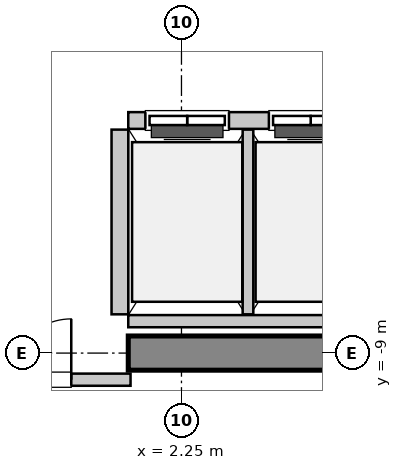
"""IFC4 building model, lengths in metres.
Left out: names, types, materials, properties, quantities, classifications, styles, units other than length and angle.
Written with IfcOpenShell. Run it as: python <this file> out.ifc"""

import sys

from ifc_helpers import new_model, si_unit, direction, frame, frame_2d, origin, place, context, subcontext, project, spatial, rectangle, extrude, source, transform, mapped, element, fill, save


model = new_model("IFC4")
c1 = context("Model", 3, precision=1e-05, world=origin(), true_north=direction((0.0, 1.0)))
c2 = subcontext(c1, "Body", "Model", "MODEL_VIEW")
j1 = project(units=[si_unit("LENGTHUNIT", "METRE"), si_unit("PLANEANGLEUNIT", "RADIAN")], contexts=[c1])
p1 = place(None, origin())
s1 = spatial("IfcSite", under=j1, at=p1, CompositionType="ELEMENT")
p2 = place(p1, origin())
s2 = spatial("IfcBuilding", under=s1, at=p2, CompositionType="ELEMENT")
p3 = place(p2, frame((0.0, 0.0, 221.8)))
s3 = spatial("IfcBuildingStorey", under=s2, at=p3, CompositionType="ELEMENT", Elevation=221.8)
m1 = source(origin(), c2, "Body", "SweptSolid", [
    extrude(rectangle(XDim=9.925, YDim=0.45, at=frame_2d((4.962, 0.0))), origin(), (0.0, 0.0, 1.0), 3.8),
])
p4 = place(p3, frame((1.55, -9.0, 0.0), z_axis=(0.0, 0.0, 1.0), x_axis=(1.0, 0.0, 0.0)))
e1 = element("IfcWall", 1, at=p4, inside=s3, PredefinedType="SHEAR", context=c2, shape_type="MappedRepresentation", body=[
    mapped(m1, transform((0.0, 0.0, 0.0), x_axis=(1.0, 0.0, 0.0), y_axis=(0.0, 1.0, 0.0), z_axis=(0.0, 0.0, 1.0), scale=1.0)),
])
m2 = source(origin(), c2, "Body", "SweptSolid", [
    extrude(rectangle(XDim=3.2, YDim=0.22, at=frame_2d((1.6, 0.0))), origin(), (0.0, 0.0, 1.0), 3.535),
])
p5 = place(p3, frame((4.75, -5.94, 0.0), z_axis=(0.0, 0.0, 1.0), x_axis=(-1.0, 0.0, 0.0)))
e2 = element("IfcWall", 2, at=p5, inside=s3, PredefinedType="SOLIDWALL", context=c2, shape_type="MappedRepresentation", body=[
    mapped(m2, transform((0.0, 0.0, 0.0), x_axis=(1.0, 0.0, 0.0), y_axis=(0.0, 1.0, 0.0), z_axis=(0.0, 0.0, 1.0), scale=1.0)),
])
p6 = place(p5, frame((1.875, 0.0, 0.0)))
e3 = element("IfcOpeningElement", 3, at=p6, cuts=e2, PredefinedType="OPENING", context=c2, shape_type="SweptSolid", body=[
    extrude(rectangle(XDim=1.1, YDim=2.2, at=frame_2d((0.55, 1.1))), frame((0.0, 0.12, 0.0), z_axis=(0.0, -1.0, 0.0), x_axis=(1.0, 0.0, 0.0)), (0.0, 0.0, 1.0), 0.24),
])
p7 = place(p5, frame((0.25, 0.0, 0.0)))
e4 = element("IfcOpeningElement", 4, at=p7, cuts=e2, PredefinedType="OPENING", context=c2, shape_type="SweptSolid", body=[
    extrude(rectangle(XDim=1.1, YDim=2.2, at=frame_2d((0.55, 1.1))), frame((0.0, 0.12, 0.0), z_axis=(0.0, -1.0, 0.0), x_axis=(1.0, 0.0, 0.0)), (0.0, 0.0, 1.0), 0.24),
])
m3 = source(origin(), c2, "Body", "SweptSolid", [
    extrude(rectangle(XDim=3.2, YDim=0.16, at=frame_2d((1.6, 0.0))), origin(), (0.0, 0.0, 1.0), 2.625),
])
p8 = place(p3, frame((1.55, -8.58, 0.0), z_axis=(0.0, 0.0, 1.0), x_axis=(1.0, 0.0, 0.0)))
e5 = element("IfcWall", 5, at=p8, inside=s3, PredefinedType="PARTITIONING", context=c2, shape_type="MappedRepresentation", body=[
    mapped(m3, transform((0.0, 0.0, 0.0), x_axis=(1.0, 0.0, 0.0), y_axis=(0.0, 1.0, 0.0), z_axis=(0.0, 0.0, 1.0), scale=1.0)),
])
m4 = source(origin(), c2, "Body", "SweptSolid", [
    extrude(rectangle(XDim=2.43, YDim=0.22, at=frame_2d((1.215, 0.0))), origin(), (0.0, 0.0, 1.0), 3.535),
])
p9 = place(p3, frame((1.44, -6.06, 0.0), z_axis=(0.0, 0.0, 1.0), x_axis=(0.0, -1.0, 0.0)))
e6 = element("IfcWall", 6, at=p9, inside=s3, PredefinedType="SOLIDWALL", context=c2, shape_type="MappedRepresentation", body=[
    mapped(m4, transform((0.0, 0.0, 0.0), x_axis=(1.0, 0.0, 0.0), y_axis=(0.0, 1.0, 0.0), z_axis=(0.0, 0.0, 1.0), scale=1.0)),
])
m5 = source(origin(), c2, "Body", "SweptSolid", [
    extrude(rectangle(XDim=2.43, YDim=0.14, at=frame_2d((1.215, 0.0))), origin(), (0.0, 0.0, 1.0), 3.535),
])
p10 = place(p3, frame((3.125, -8.49, 0.0), z_axis=(0.0, 0.0, 1.0), x_axis=(0.0, 1.0, 0.0)))
e7 = element("IfcWall", 7, at=p10, inside=s3, PredefinedType="PARTITIONING", context=c2, shape_type="MappedRepresentation", body=[
    mapped(m5, transform((0.0, 0.0, 0.0), x_axis=(1.0, 0.0, 0.0), y_axis=(0.0, 1.0, 0.0), z_axis=(0.0, 0.0, 1.0), scale=1.0)),
])
m6 = source(origin(), c2, "Body", "SweptSolid", [
    extrude(rectangle(XDim=3.16, YDim=0.16, at=frame_2d((1.58, 0.0))), origin(), (0.0, 0.0, 1.0), 2.625),
])
p11 = place(p3, frame((-1.58, -9.35, 0.0), z_axis=(0.0, 0.0, 1.0), x_axis=(1.0, 0.0, 0.0)))
e8 = element("IfcWall", 8, at=p11, inside=s3, PredefinedType="PARTITIONING", context=c2, shape_type="MappedRepresentation", body=[
    mapped(m6, transform((0.0, 0.0, 0.0), x_axis=(1.0, 0.0, 0.0), y_axis=(0.0, 1.0, 0.0), z_axis=(0.0, 0.0, 1.0), scale=1.0)),
])
p12 = place(p11, frame((0.78, 0.0, 0.0)))
e9 = element("IfcOpeningElement", 9, at=p12, cuts=e8, PredefinedType="OPENING", context=c2, shape_type="SweptSolid", body=[
    extrude(rectangle(XDim=1.6, YDim=2.3, at=frame_2d((0.8, 1.15))), frame((0.0, 0.09, 0.0), z_axis=(0.0, -1.0, 0.0), x_axis=(1.0, 0.0, 0.0)), (0.0, 0.0, 1.0), 0.18),
])
m7 = source(origin(), c2, "Body", "SweptSolid", [
    extrude(rectangle(XDim=1.1, YDim=2.2, at=frame_2d((0.55, 1.1))), frame((0.0, 0.025, 0.0), z_axis=(0.0, -1.0, 0.0), x_axis=(1.0, 0.0, 0.0)), (0.0, 0.0, 1.0), 0.05),
])
p13 = place(p6, origin())
e10 = element("IfcDoor", 10, at=p13, inside=s3, OperationType="DOUBLE_DOOR_SLIDING", PredefinedType="DOOR", context=c2, shape_type="MappedRepresentation", body=[
    mapped(m7, transform((0.0, 0.0, 0.0), x_axis=(1.0, 0.0, 0.0), y_axis=(0.0, 1.0, 0.0), z_axis=(0.0, 0.0, 1.0), scale=1.0)),
])
fill(e3, e10)
p14 = place(p7, origin())
e11 = element("IfcDoor", 11, at=p14, inside=s3, OperationType="DOUBLE_DOOR_SLIDING", PredefinedType="DOOR", context=c2, shape_type="MappedRepresentation", body=[
    mapped(m7, transform((0.0, 0.0, 0.0), x_axis=(1.0, 0.0, 0.0), y_axis=(0.0, 1.0, 0.0), z_axis=(0.0, 0.0, 1.0), scale=1.0)),
])
fill(e4, e11)
m8 = source(origin(), c2, "Body", "SweptSolid", [
    extrude(rectangle(XDim=1.6, YDim=2.3, at=frame_2d((0.8, 1.15))), frame((0.0, 0.025, 0.0), z_axis=(0.0, -1.0, 0.0), x_axis=(1.0, 0.0, 0.0)), (0.0, 0.0, 1.0), 0.05),
])
p15 = place(p12, origin())
e12 = element("IfcDoor", 12, at=p15, inside=s3, OperationType="DOUBLE_DOOR_SINGLE_SWING", PredefinedType="DOOR", context=c2, shape_type="MappedRepresentation", body=[
    mapped(m8, transform((0.0, 0.0, 0.0), x_axis=(1.0, 0.0, 0.0), y_axis=(0.0, 1.0, 0.0), z_axis=(0.0, 0.0, 1.0), scale=1.0)),
])
fill(e9, e12)
save(model, sys.argv[1])
